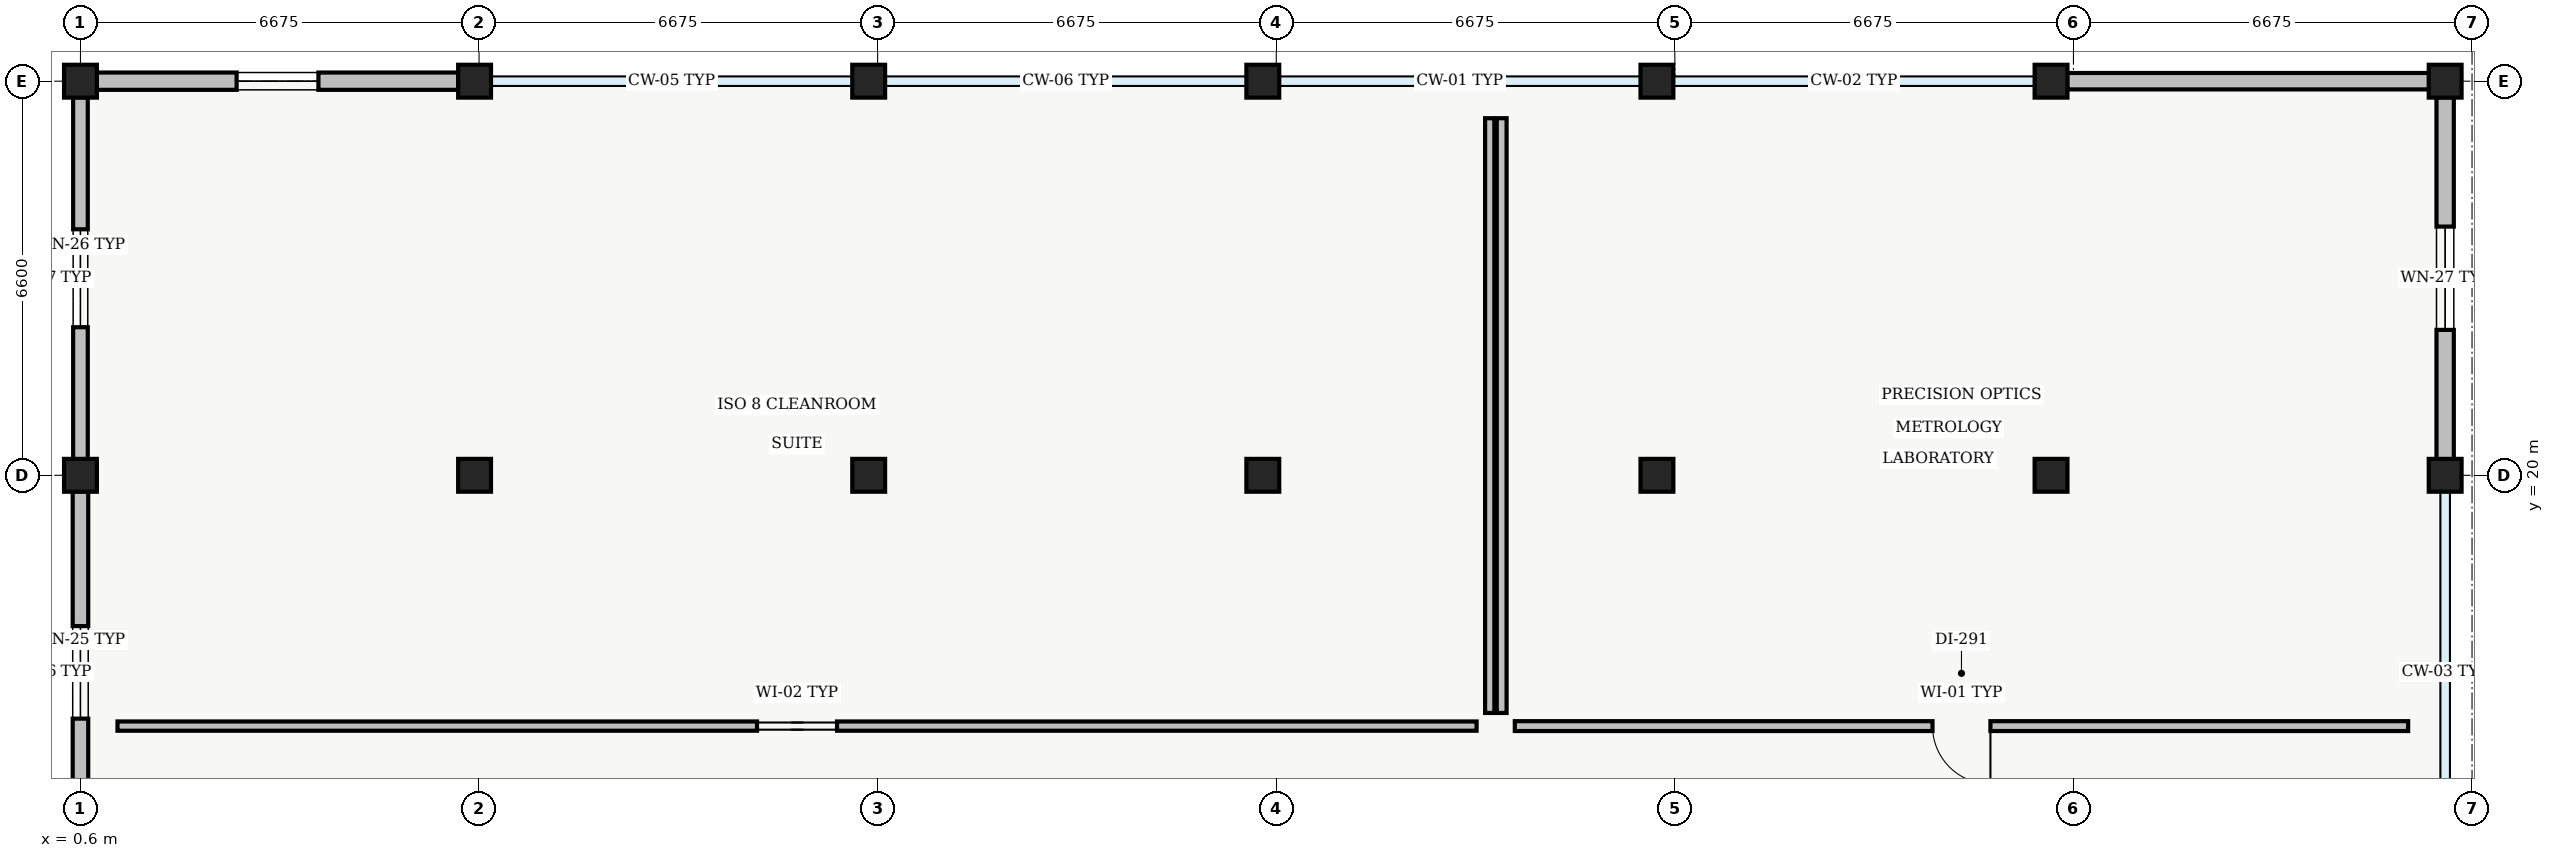
"""IFC4 building model, lengths in metres.
Left out: names, types, materials, properties, quantities, classifications, styles, units other than length and angle.
Written with IfcOpenShell. Run it as: python <this file> out.ifc"""

import sys

from ifc_helpers import new_model, si_unit, direction, frame, frame_2d, origin, origin_2d, place, context, subcontext, project, spatial, rectangle, extrude, element, fill, save


model = new_model("IFC4")
c1 = context("Model", 3, precision=1e-05, world=origin(), true_north=direction((0.0, 1.0)))
c2 = subcontext(c1, "Body", "Model", "MODEL_VIEW")
j1 = project(units=[si_unit("LENGTHUNIT", "METRE"), si_unit("PLANEANGLEUNIT", "RADIAN")], contexts=[c1])
p1 = place(None, origin())
s1 = spatial("IfcSite", under=j1, at=p1, CompositionType="ELEMENT")
p2 = place(p1, origin())
s2 = spatial("IfcBuilding", under=s1, at=p2, CompositionType="ELEMENT")
p3 = place(p2, frame((0.0, 0.0, 14.1)))
s3 = spatial("IfcBuildingStorey", under=s2, at=p3, CompositionType="ELEMENT", Elevation=14.1)
for number, where, z_axis, x_axis in (
    (1, (0.6, 20.0, 0.0), (0.0, 0.0, 1.0), (1.0, 0.0, 0.0)),
    (2, (0.6, 26.6, 0.0), (0.0, 0.0, 1.0), (1.0, 0.0, 0.0)),
    (3, (7.2, 20.0, 0.0), (0.0, 0.0, 1.0), (1.0, 0.0, 0.0)),
    (4, (7.2, 26.6, 0.0), (0.0, 0.0, 1.0), (1.0, 0.0, 0.0)),
    (5, (13.8, 20.0, 0.0), (0.0, 0.0, 1.0), (1.0, 0.0, 0.0)),
    (6, (13.8, 26.6, 0.0), (0.0, 0.0, 1.0), (1.0, 0.0, 0.0)),
    (7, (20.4, 20.0, 0.0), (0.0, 0.0, 1.0), (1.0, 0.0, 0.0)),
    (8, (20.4, 26.6, 0.0), (0.0, 0.0, 1.0), (1.0, 0.0, 0.0)),
    (9, (27.0, 20.0, 0.0), (0.0, 0.0, 1.0), (1.0, 0.0, 0.0)),
    (10, (27.0, 26.6, 0.0), (0.0, 0.0, 1.0), (1.0, 0.0, 0.0)),
    (11, (33.6, 20.0, 0.0), (0.0, 0.0, 1.0), (1.0, 0.0, 0.0)),
    (12, (33.6, 26.6, 0.0), (0.0, 0.0, 1.0), (1.0, 0.0, 0.0)),
    (13, (40.2, 20.0, 0.0), (0.0, 0.0, 1.0), (1.0, 0.0, 0.0)),
    (14, (40.2, 26.6, 0.0), (0.0, 0.0, 1.0), (1.0, 0.0, 0.0)),
):
    element("IfcColumn", number, at=place(p3, frame(where, z_axis=z_axis, x_axis=x_axis)), inside=s3, PredefinedType="COLUMN", context=c2, shape_type="SweptSolid", body=[
        extrude(rectangle(XDim=0.55, YDim=0.55, at=origin_2d()), origin(), (0.0, 0.0, 1.0), 4.3),
    ])
p4 = place(p3, frame((0.6, 13.67, 0.0), z_axis=(0.0, 0.0, 1.0), x_axis=(0.0, 1.0, 0.0)))
e15 = element("IfcWall", 15, at=p4, inside=s3, PredefinedType="STANDARD", context=c2, shape_type="SweptSolid", body=[
    extrude(rectangle(XDim=6.06, YDim=0.26, at=frame_2d((3.03, 0.0))), origin(), (0.0, 0.0, 1.0), 3.785),
])
p5 = place(p4, frame((2.255, 0.0, 0.95)))
e16 = element("IfcOpeningElement", 16, at=p5, cuts=e15, PredefinedType="OPENING", context=c2, shape_type="SweptSolid", body=[
    extrude(rectangle(XDim=1.55, YDim=1.46, at=frame_2d((0.775, 0.73))), frame((0.0, 0.13, 0.0), z_axis=(0.0, -1.0, 0.0), x_axis=(1.0, 0.0, 0.0)), (0.0, 0.0, 1.0), 0.26),
])
p6 = place(p3, frame((0.6, 20.27, 0.0), z_axis=(0.0, 0.0, 1.0), x_axis=(0.0, 1.0, 0.0)))
e17 = element("IfcWall", 17, at=p6, inside=s3, PredefinedType="STANDARD", context=c2, shape_type="SweptSolid", body=[
    extrude(rectangle(XDim=6.06, YDim=0.245, at=frame_2d((3.03, 0.0))), origin(), (0.0, 0.0, 1.0), 3.785),
])
p7 = place(p6, frame((2.21, 0.0, 0.95)))
e18 = element("IfcOpeningElement", 18, at=p7, cuts=e17, PredefinedType="OPENING", context=c2, shape_type="SweptSolid", body=[
    extrude(rectangle(XDim=1.64, YDim=1.48, at=frame_2d((0.82, 0.74))), frame((0.0, 0.123, 0.0), z_axis=(0.0, -1.0, 0.0), x_axis=(1.0, 0.0, 0.0)), (0.0, 0.0, 1.0), 0.245),
])
p8 = place(p3, frame((0.87, 26.6, 0.0), z_axis=(0.0, 0.0, 1.0), x_axis=(1.0, 0.0, 0.0)))
e19 = element("IfcWall", 19, at=p8, inside=s3, PredefinedType="STANDARD", context=c2, shape_type="SweptSolid", body=[
    extrude(rectangle(XDim=6.06, YDim=0.29, at=frame_2d((3.03, 0.0))), origin(), (0.0, 0.0, 1.0), 3.785),
])
p9 = place(p8, frame((2.345, 0.0, 0.95)))
e20 = element("IfcOpeningElement", 20, at=p9, cuts=e19, PredefinedType="OPENING", context=c2, shape_type="SweptSolid", body=[
    extrude(rectangle(XDim=1.37, YDim=1.42, at=frame_2d((0.685, 0.71))), frame((0.0, 0.145, 0.0), z_axis=(0.0, -1.0, 0.0), x_axis=(1.0, 0.0, 0.0)), (0.0, 0.0, 1.0), 0.29),
])
p10 = place(p3, frame((33.87, 26.6, 0.0), z_axis=(0.0, 0.0, 1.0), x_axis=(1.0, 0.0, 0.0)))
e21 = element("IfcWall", 21, at=p10, inside=s3, PredefinedType="STANDARD", context=c2, shape_type="SweptSolid", body=[
    extrude(rectangle(XDim=6.06, YDim=0.275, at=frame_2d((3.03, 0.0))), origin(), (0.0, 0.0, 1.0), 3.785),
])
p11 = place(p3, frame((40.2, 26.33, 0.0), z_axis=(0.0, 0.0, 1.0), x_axis=(0.0, -1.0, 0.0)))
e22 = element("IfcWall", 22, at=p11, inside=s3, PredefinedType="STANDARD", context=c2, shape_type="SweptSolid", body=[
    extrude(rectangle(XDim=6.06, YDim=0.29, at=frame_2d((3.03, 0.0))), origin(), (0.0, 0.0, 1.0), 3.785),
])
p12 = place(p11, frame((2.165, 0.0, 0.95)))
e23 = element("IfcOpeningElement", 23, at=p12, cuts=e22, PredefinedType="OPENING", context=c2, shape_type="SweptSolid", body=[
    extrude(rectangle(XDim=1.73, YDim=1.36, at=frame_2d((0.865, 0.68))), frame((0.0, 0.145, 0.0), z_axis=(0.0, -1.0, 0.0), x_axis=(1.0, 0.0, 0.0)), (0.0, 0.0, 1.0), 0.29),
])
p13 = place(p3, frame((1.22, 15.8, 0.0), z_axis=(0.0, 0.0, 1.0), x_axis=(1.0, 0.0, 0.0)))
e24 = element("IfcWall", 24, at=p13, inside=s3, PredefinedType="PARTITIONING", context=c2, shape_type="SweptSolid", body=[
    extrude(rectangle(XDim=22.76, YDim=0.155, at=frame_2d((11.38, 0.0))), origin(), (0.0, 0.0, 1.0), 3.885),
])
p14 = place(p13, frame((10.71, 0.0, 0.0)))
e25 = element("IfcOpeningElement", 25, at=p14, cuts=e24, PredefinedType="OPENING", context=c2, shape_type="SweptSolid", body=[
    extrude(rectangle(XDim=1.34, YDim=2.2, at=frame_2d((0.67, 1.1))), frame((0.0, 0.078, 0.0), z_axis=(0.0, -1.0, 0.0), x_axis=(1.0, 0.0, 0.0)), (0.0, 0.0, 1.0), 0.155),
])
p15 = place(p3, frame((24.2, 16.02, 0.0), z_axis=(0.0, 0.0, 1.0), x_axis=(0.0, 1.0, 0.0)))
e26 = element("IfcWall", 26, at=p15, inside=s3, PredefinedType="PARTITIONING", context=c2, shape_type="SweptSolid", body=[
    extrude(rectangle(XDim=9.96, YDim=0.155, at=frame_2d((4.98, 0.0))), origin(), (0.0, 0.0, 1.0), 3.95),
])
p16 = place(p3, frame((24.62, 15.8, 0.0), z_axis=(0.0, 0.0, 1.0), x_axis=(1.0, 0.0, 0.0)))
e27 = element("IfcWall", 27, at=p16, inside=s3, PredefinedType="PARTITIONING", context=c2, shape_type="SweptSolid", body=[
    extrude(rectangle(XDim=14.96, YDim=0.165, at=frame_2d((7.48, 0.0))), origin(), (0.0, 0.0, 1.0), 3.885),
])
p17 = place(p16, frame((6.995, 0.0, 0.0)))
e28 = element("IfcOpeningElement", 28, at=p17, cuts=e27, PredefinedType="OPENING", context=c2, shape_type="SweptSolid", body=[
    extrude(rectangle(XDim=0.97, YDim=2.12, at=frame_2d((0.485, 1.06))), frame((0.0, 0.083, 0.0), z_axis=(0.0, -1.0, 0.0), x_axis=(1.0, 0.0, 0.0)), (0.0, 0.0, 1.0), 0.165),
])
p18 = place(p3, frame((24.4, 25.98, 0.0), z_axis=(0.0, 0.0, 1.0), x_axis=(0.0, -1.0, 0.0)))
e29 = element("IfcWall", 29, at=p18, inside=s3, PredefinedType="PARTITIONING", context=c2, shape_type="SweptSolid", body=[
    extrude(rectangle(XDim=9.96, YDim=0.165, at=frame_2d((4.98, 0.0))), origin(), (0.0, 0.0, 1.0), 3.95),
])
p19 = place(p5, origin())
e30 = element("IfcWindow", 30, at=p19, inside=s3, PartitioningType="SINGLE_PANEL", PredefinedType="WINDOW", context=c2, shape_type="SweptSolid", body=[
    extrude(rectangle(XDim=1.55, YDim=1.46, at=frame_2d((0.775, 0.73))), frame((0.0, 0.03, 0.0), z_axis=(0.0, -1.0, 0.0), x_axis=(1.0, 0.0, 0.0)), (0.0, 0.0, 1.0), 0.06),
])
fill(e16, e30)
p20 = place(p7, origin())
e31 = element("IfcWindow", 31, at=p20, inside=s3, PartitioningType="SINGLE_PANEL", PredefinedType="WINDOW", context=c2, shape_type="SweptSolid", body=[
    extrude(rectangle(XDim=1.64, YDim=1.48, at=frame_2d((0.82, 0.74))), frame((0.0, 0.03, 0.0), z_axis=(0.0, -1.0, 0.0), x_axis=(1.0, 0.0, 0.0)), (0.0, 0.0, 1.0), 0.06),
])
fill(e18, e31)
p21 = place(p9, origin())
e32 = element("IfcWindow", 32, at=p21, inside=s3, PartitioningType="SINGLE_PANEL", PredefinedType="WINDOW", context=c2, shape_type="SweptSolid", body=[
    extrude(rectangle(XDim=1.37, YDim=1.42, at=frame_2d((0.685, 0.71))), frame((0.0, 0.03, 0.0), z_axis=(0.0, -1.0, 0.0), x_axis=(1.0, 0.0, 0.0)), (0.0, 0.0, 1.0), 0.06),
])
fill(e20, e32)
p22 = place(p12, origin())
e33 = element("IfcWindow", 33, at=p22, inside=s3, PartitioningType="SINGLE_PANEL", PredefinedType="WINDOW", context=c2, shape_type="SweptSolid", body=[
    extrude(rectangle(XDim=1.73, YDim=1.36, at=frame_2d((0.865, 0.68))), frame((0.0, 0.03, 0.0), z_axis=(0.0, -1.0, 0.0), x_axis=(1.0, 0.0, 0.0)), (0.0, 0.0, 1.0), 0.06),
])
fill(e23, e33)
p23 = place(p14, origin())
e34 = element("IfcDoor", 34, at=p23, inside=s3, OperationType="SLIDING_TO_RIGHT", PredefinedType="DOOR", context=c2, shape_type="SweptSolid", body=[
    extrude(rectangle(XDim=1.34, YDim=2.2, at=frame_2d((0.67, 1.1))), frame((0.0, 0.025, 0.0), z_axis=(0.0, -1.0, 0.0), x_axis=(1.0, 0.0, 0.0)), (0.0, 0.0, 1.0), 0.05),
])
fill(e25, e34)
p24 = place(p17, origin())
e35 = element("IfcDoor", 35, at=p24, inside=s3, OperationType="SINGLE_SWING_RIGHT", PredefinedType="DOOR", context=c2, shape_type="SweptSolid", body=[
    extrude(rectangle(XDim=0.97, YDim=2.12, at=frame_2d((0.485, 1.06))), frame((0.0, 0.025, 0.0), z_axis=(0.0, -1.0, 0.0), x_axis=(1.0, 0.0, 0.0)), (0.0, 0.0, 1.0), 0.05),
])
fill(e28, e35)
save(model, sys.argv[1])
